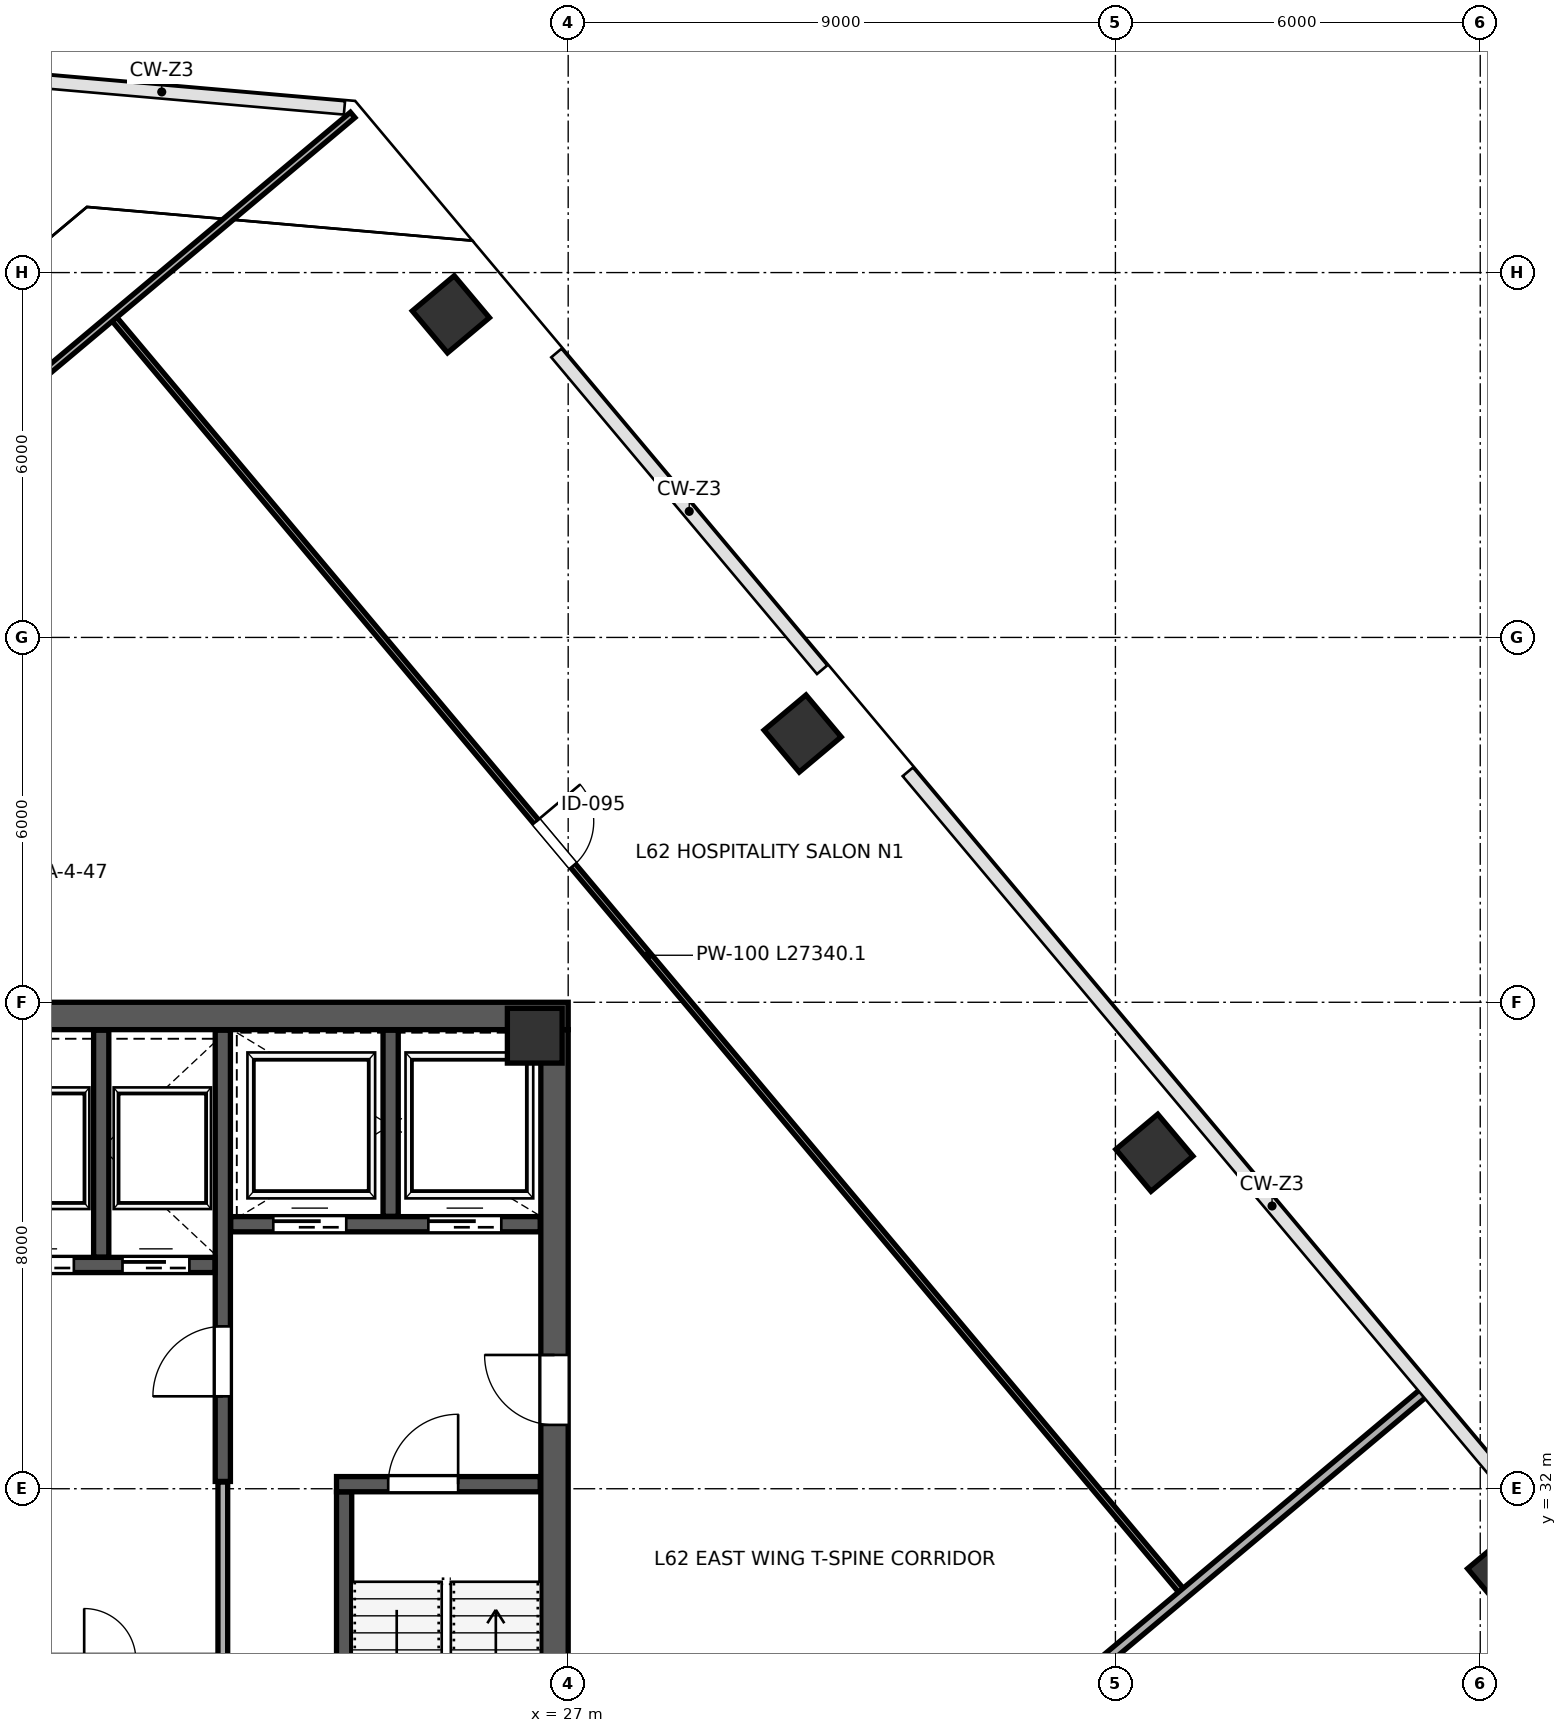
"""IFC4 building model, lengths in metres.
Left out: names, types, materials, properties, quantities, classifications, styles, units other than length and angle.
Written with IfcOpenShell. Run it as: python <this file> out.ifc"""

import sys

from ifc_helpers import new_model, si_unit, direction, frame, frame_2d, origin, origin_2d, place, context, subcontext, project, spatial, rectangle, extrude, clip, halfspace, source, transform, mapped, element, fill, save


model = new_model("IFC4")
c1 = context("Model", 3, precision=1e-05, world=origin(), true_north=direction((0.0, 1.0)))
c2 = subcontext(c1, "Body", "Model", "MODEL_VIEW")
j1 = project(units=[si_unit("LENGTHUNIT", "METRE"), si_unit("PLANEANGLEUNIT", "RADIAN")], contexts=[c1])
p1 = place(None, origin())
s1 = spatial("IfcSite", under=j1, at=p1, CompositionType="ELEMENT")
p2 = place(p1, origin())
s2 = spatial("IfcBuilding", under=s1, at=p2, CompositionType="ELEMENT")
p3 = place(p2, frame((0.0, 0.0, 275.2)))
s3 = spatial("IfcBuildingStorey", under=s2, at=p3, CompositionType="ELEMENT", Elevation=275.2)
m1 = source(origin(), c2, "Body", "SweptSolid", [
    extrude(rectangle(XDim=0.9, YDim=0.9, at=origin_2d()), origin(), (0.0, 0.0, 1.0), 4.198),
])
p4 = place(p3, frame((26.45, 39.45, 0.001), z_axis=(0.0, 0.0, 1.0), x_axis=(1.0, 0.0, 0.0)))
e1 = element("IfcColumn", 1, at=p4, inside=s3, PredefinedType="COLUMN", context=c2, shape_type="MappedRepresentation", body=[
    mapped(m1, transform((0.0, 0.0, 0.0), scale=1.0)),
])
p5 = place(p3, frame((25.071, 51.314, 0.0), z_axis=(0.195757198918, -0.040609509115, 0.97981119959), x_axis=(-0.865497065717, -0.47692710416, 0.153151449724)))
e2 = element("IfcColumn", 2, at=p5, inside=s3, PredefinedType="COLUMN", context=c2, shape_type="Clipping", body=[
    clip(clip(extrude(rectangle(XDim=0.9, YDim=0.9, at=origin_2d()), origin(), (0.0, 0.0, 1.0), 4.286), halfspace(frame((0.0, 0.0, 0.13), z_axis=(0.0, 0.0, -1.0), x_axis=(1.0, 0.0, 0.0)), False)), halfspace(frame((0.0, 0.0, 4.156), z_axis=(0.0, 0.0, 1.0), x_axis=(1.0, 0.0, 0.0)), False)),
])
p6 = place(p3, frame((30.856, 44.419, 0.0), z_axis=(0.125272246636, -0.098702823735, 0.987200393441), x_axis=(-0.991823762749, -0.03687177893, 0.122172400995)))
e3 = element("IfcColumn", 3, at=p6, inside=s3, PredefinedType="COLUMN", context=c2, shape_type="Clipping", body=[
    clip(clip(extrude(rectangle(XDim=0.9, YDim=0.9, at=origin_2d()), origin(), (0.0, 0.0, 1.0), 4.254), halfspace(frame((0.0, 0.0, 0.103), z_axis=(0.0, 0.0, -1.0), x_axis=(1.0, 0.0, 0.0)), False)), halfspace(frame((0.0, 0.0, 4.151), z_axis=(0.0, 0.0, 1.0), x_axis=(1.0, 0.0, 0.0)), False)),
])
p7 = place(p3, frame((36.641, 37.525, 0.0), z_axis=(0.053203849218, -0.156286307078, 0.986277821229), x_axis=(-0.851975649645, 0.508077730488, 0.12646941209)))
e4 = element("IfcColumn", 4, at=p7, inside=s3, PredefinedType="COLUMN", context=c2, shape_type="Clipping", body=[
    clip(clip(extrude(rectangle(XDim=0.9, YDim=0.9, at=origin_2d()), origin(), (0.0, 0.0, 1.0), 4.258), halfspace(frame((0.0, 0.0, 0.107), z_axis=(0.0, 0.0, -1.0), x_axis=(1.0, 0.0, 0.0)), False)), halfspace(frame((0.0, 0.0, 4.151), z_axis=(0.0, 0.0, 1.0), x_axis=(1.0, 0.0, 0.0)), False)),
])
p8 = place(p3, frame((42.426, 30.631, 0.0), z_axis=(-0.018572564847, -0.212079379625, 0.97707594207), x_axis=(-0.57503935286, 0.801706521866, 0.163084013501)))
e5 = element("IfcColumn", 5, at=p8, inside=s3, PredefinedType="COLUMN", context=c2, shape_type="Clipping", body=[
    clip(clip(extrude(rectangle(XDim=0.9, YDim=0.9, at=origin_2d()), origin(), (0.0, 0.0, 1.0), 4.299), halfspace(frame((0.0, 0.0, 0.139), z_axis=(0.0, 0.0, -1.0), x_axis=(1.0, 0.0, 0.0)), False)), halfspace(frame((0.0, 0.0, 4.16), z_axis=(0.0, 0.0, 1.0), x_axis=(1.0, 0.0, 0.0)), False)),
])
p9 = place(p3, frame((26.775, 24.45, 0.0), z_axis=(0.0, 0.0, 1.0), x_axis=(0.0, 1.0, 0.0)))
e6 = element("IfcWall", 6, at=p9, inside=s3, PredefinedType="SHEAR", context=c2, shape_type="SweptSolid", body=[
    extrude(rectangle(XDim=15.1, YDim=0.45, at=frame_2d((7.55, 0.0))), origin(), (0.0, 0.0, 1.0), 3.96),
])
p10 = place(p9, frame((8.6, 0.0, 0.0)))
e7 = element("IfcOpeningElement", 7, at=p10, cuts=e6, PredefinedType="OPENING", context=c2, shape_type="SweptSolid", body=[
    extrude(rectangle(XDim=1.15, YDim=2.2, at=frame_2d((0.575, 1.1))), frame((0.0, 0.235, 0.0), z_axis=(0.0, -1.0, 0.0), x_axis=(1.0, 0.0, 0.0)), (0.0, 0.0, 1.0), 0.47),
])
p11 = place(p3, frame((9.0, 39.775, 0.0), z_axis=(0.0, 0.0, 1.0), x_axis=(1.0, 0.0, 0.0)))
e8 = element("IfcWall", 8, at=p11, inside=s3, PredefinedType="SHEAR", context=c2, shape_type="SweptSolid", body=[
    extrude(rectangle(XDim=18.0, YDim=0.45, at=frame_2d((9.0, 0.0))), origin(), (0.0, 0.0, 1.0), 3.96),
])
p12 = place(p3, frame((23.315, 24.46, 0.0), z_axis=(0.0, 0.0, 1.0), x_axis=(0.0, 1.0, 0.0)))
e9 = element("IfcWall", 9, at=p12, inside=s3, PredefinedType="SHEAR", context=c2, shape_type="SweptSolid", body=[
    extrude(rectangle(XDim=7.49, YDim=0.25, at=frame_2d((3.745, 0.0))), origin(), (0.0, 0.0, 1.0), 3.96),
])
p13 = place(p3, frame((23.19, 32.075, 0.0), z_axis=(0.0, 0.0, 1.0), x_axis=(1.0, 0.0, 0.0)))
e10 = element("IfcWall", 10, at=p13, inside=s3, PredefinedType="SHEAR", context=c2, shape_type="SweptSolid", body=[
    extrude(rectangle(XDim=3.35, YDim=0.25, at=frame_2d((1.675, 0.0))), origin(), (0.0, 0.0, 1.0), 3.96),
])
p14 = place(p13, frame((0.85, 0.0, 0.0)))
e11 = element("IfcOpeningElement", 11, at=p14, cuts=e10, PredefinedType="OPENING", context=c2, shape_type="SweptSolid", body=[
    extrude(rectangle(XDim=1.15, YDim=2.2, at=frame_2d((0.575, 1.1))), frame((0.0, 0.135, 0.0), z_axis=(0.0, -1.0, 0.0), x_axis=(1.0, 0.0, 0.0)), (0.0, 0.0, 1.0), 0.27),
])
p15 = place(p3, frame((21.32, 32.12, 0.0), z_axis=(0.0, 0.0, 1.0), x_axis=(0.0, 1.0, 0.0)))
e12 = element("IfcWall", 12, at=p15, inside=s3, PredefinedType="SHEAR", context=c2, shape_type="SweptSolid", body=[
    extrude(rectangle(XDim=7.42, YDim=0.25, at=frame_2d((3.71, 0.0))), origin(), (0.0, 0.0, 1.0), 3.96),
])
p16 = place(p15, frame((1.4, 0.0, 0.0)))
e13 = element("IfcOpeningElement", 13, at=p16, cuts=e12, PredefinedType="OPENING", context=c2, shape_type="SweptSolid", body=[
    extrude(rectangle(XDim=1.15, YDim=2.2, at=frame_2d((0.575, 1.1))), frame((0.0, 0.135, 0.0), z_axis=(0.0, -1.0, 0.0), x_axis=(1.0, 0.0, 0.0)), (0.0, 0.0, 1.0), 0.27),
])
p17 = place(p3, frame((21.45, 36.35, 0.0), z_axis=(0.0, 0.0, 1.0), x_axis=(1.0, 0.0, 0.0)))
e14 = element("IfcWall", 14, at=p17, inside=s3, PredefinedType="SHEAR", context=c2, shape_type="SweptSolid", body=[
    extrude(rectangle(XDim=5.09, YDim=0.25, at=frame_2d((2.545, 0.0))), origin(), (0.0, 0.0, 1.0), 3.96),
])
p18 = place(p17, frame((0.7, 0.0, 0.0)))
e15 = element("IfcOpeningElement", 15, at=p18, cuts=e14, PredefinedType="OPENING", context=c2, shape_type="SweptSolid", body=[
    extrude(rectangle(XDim=1.2, YDim=2.2, at=frame_2d((0.6, 1.1))), frame((0.0, 0.135, 0.0), z_axis=(0.0, -1.0, 0.0), x_axis=(1.0, 0.0, 0.0)), (0.0, 0.0, 1.0), 0.27),
])
p19 = place(p17, frame((3.25, 0.0, 0.0)))
e16 = element("IfcOpeningElement", 16, at=p19, cuts=e14, PredefinedType="OPENING", context=c2, shape_type="SweptSolid", body=[
    extrude(rectangle(XDim=1.2, YDim=2.2, at=frame_2d((0.6, 1.1))), frame((0.0, 0.135, 0.0), z_axis=(0.0, -1.0, 0.0), x_axis=(1.0, 0.0, 0.0)), (0.0, 0.0, 1.0), 0.27),
])
p20 = place(p3, frame((24.08, 36.48, 0.0), z_axis=(0.0, 0.0, 1.0), x_axis=(0.0, 1.0, 0.0)))
e17 = element("IfcWall", 17, at=p20, inside=s3, PredefinedType="SHEAR", context=c2, shape_type="SweptSolid", body=[
    extrude(rectangle(XDim=3.06, YDim=0.25, at=frame_2d((1.53, 0.0))), origin(), (0.0, 0.0, 1.0), 3.96),
])
p21 = place(p3, frame((17.32, 35.68, 0.0), z_axis=(0.0, 0.0, 1.0), x_axis=(1.0, 0.0, 0.0)))
e18 = element("IfcWall", 18, at=p21, inside=s3, PredefinedType="SHEAR", context=c2, shape_type="SweptSolid", body=[
    extrude(rectangle(XDim=3.87, YDim=0.25, at=frame_2d((1.935, 0.0))), origin(), (0.0, 0.0, 1.0), 3.96),
])
p22 = place(p21, frame((0.45, 0.0, 0.0)))
e19 = element("IfcOpeningElement", 19, at=p22, cuts=e18, PredefinedType="OPENING", context=c2, shape_type="SweptSolid", body=[
    extrude(rectangle(XDim=1.1, YDim=2.2, at=frame_2d((0.55, 1.1))), frame((0.0, 0.135, 0.0), z_axis=(0.0, -1.0, 0.0), x_axis=(1.0, 0.0, 0.0)), (0.0, 0.0, 1.0), 0.27),
])
p23 = place(p21, frame((2.35, 0.0, 0.0)))
e20 = element("IfcOpeningElement", 20, at=p23, cuts=e18, PredefinedType="OPENING", context=c2, shape_type="SweptSolid", body=[
    extrude(rectangle(XDim=1.1, YDim=2.2, at=frame_2d((0.55, 1.1))), frame((0.0, 0.135, 0.0), z_axis=(0.0, -1.0, 0.0), x_axis=(1.0, 0.0, 0.0)), (0.0, 0.0, 1.0), 0.27),
])
p24 = place(p3, frame((19.32, 35.81, 0.0), z_axis=(0.0, 0.0, 1.0), x_axis=(0.0, 1.0, 0.0)))
e21 = element("IfcWall", 21, at=p24, inside=s3, PredefinedType="SHEAR", context=c2, shape_type="SweptSolid", body=[
    extrude(rectangle(XDim=3.73, YDim=0.25, at=frame_2d((1.865, 0.0))), origin(), (0.0, 0.0, 1.0), 3.96),
])
p25 = place(p3, frame((21.32, 29.19, 0.0), z_axis=(0.0, 0.0, 1.0), x_axis=(0.0, 1.0, 0.0)))
e22 = element("IfcWall", 22, at=p25, inside=s3, PredefinedType="PARTITIONING", context=c2, shape_type="SweptSolid", body=[
    extrude(rectangle(XDim=2.92, YDim=0.16, at=frame_2d((1.46, 0.0))), origin(), (0.0, 0.0, 1.0), 3.96),
])
p26 = place(p3, frame((19.528, 51.245, 0.0), z_axis=(0.0, 0.0, 1.0), x_axis=(0.642782364439, -0.766048844374, 0.0)))
e23 = element("IfcWall", 23, at=p26, inside=s3, PredefinedType="PARTITIONING", context=c2, shape_type="SweptSolid", body=[
    extrude(rectangle(XDim=27.34, YDim=0.1, at=frame_2d((13.67, 0.0))), origin(), (0.0, 0.0, 1.0), 3.96),
])
p27 = place(p26, frame((10.8, 0.0, 0.0)))
e24 = element("IfcOpeningElement", 24, at=p27, cuts=e23, PredefinedType="OPENING", context=c2, shape_type="SweptSolid", body=[
    extrude(rectangle(XDim=0.95, YDim=2.15, at=frame_2d((0.475, 1.075))), frame((0.0, 0.06, 0.0), z_axis=(0.0, -1.0, 0.0), x_axis=(1.0, 0.0, 0.0)), (0.0, 0.0, 1.0), 0.12),
])
p28 = place(p3, frame((0.849, 35.624, 0.0), z_axis=(0.0, 0.0, 1.0), x_axis=(0.766042777978, 0.642789594119, 0.0)))
e25 = element("IfcWall", 25, at=p28, inside=s3, PredefinedType="PARTITIONING", context=c2, shape_type="SweptSolid", body=[
    extrude(rectangle(XDim=29.51, YDim=0.115, at=frame_2d((14.755, 0.0))), origin(), (0.0, 0.0, 1.0), 3.96),
])
p29 = place(p28, frame((2.6, 0.0, 0.0)))
e26 = element("IfcOpeningElement", 26, at=p29, cuts=e25, PredefinedType="OPENING", context=c2, shape_type="SweptSolid", body=[
    extrude(rectangle(XDim=0.95, YDim=2.15, at=frame_2d((0.475, 1.075))), frame((0.0, 0.067, 0.0), z_axis=(0.0, -1.0, 0.0), x_axis=(1.0, 0.0, 0.0)), (0.0, 0.0, 1.0), 0.135),
])
p30 = place(p3, frame((25.576, 20.577, 0.0), z_axis=(0.0, 0.0, 1.0), x_axis=(0.76604764673, 0.642783791752, 0.0)))
e27 = element("IfcWall", 27, at=p30, inside=s3, PredefinedType="PARTITIONING", context=c2, shape_type="SweptSolid", body=[
    extrude(rectangle(XDim=20.24, YDim=0.16, at=frame_2d((10.12, 0.0))), origin(), (0.0, 0.0, 1.0), 3.195),
])
p31 = place(p3, frame((28.796, 16.74, 0.0), z_axis=(0.0, 0.0, 1.0), x_axis=(0.766036723368, 0.642796809616, 0.0)))
e28 = element("IfcWall", 28, at=p31, inside=s3, PredefinedType="PARTITIONING", context=c2, shape_type="SweptSolid", body=[
    extrude(rectangle(XDim=20.24, YDim=0.135, at=frame_2d((10.12, 0.0))), origin(), (0.0, 0.0, 1.0), 3.96),
])
m2 = source(origin(), c2, "Body", "SweptSolid", [
    extrude(rectangle(XDim=1.15, YDim=2.2, at=frame_2d((0.575, 1.1))), frame((0.0, 0.025, 0.0), z_axis=(0.0, -1.0, 0.0), x_axis=(1.0, 0.0, 0.0)), (0.0, 0.0, 1.0), 0.05),
])
p32 = place(p16, origin())
e29 = element("IfcDoor", 29, at=p32, inside=s3, OperationType="SINGLE_SWING_LEFT", PredefinedType="DOOR", context=c2, shape_type="MappedRepresentation", body=[
    mapped(m2, transform((0.0, 0.0, 0.0), scale=1.0)),
])
fill(e13, e29)
m3 = source(origin(), c2, "Body", "SweptSolid", [
    extrude(rectangle(XDim=1.15, YDim=2.2, at=frame_2d((0.575, 1.1))), frame((0.0, 0.025, 0.0), z_axis=(0.0, -1.0, 0.0), x_axis=(1.0, 0.0, 0.0)), (0.0, 0.0, 1.0), 0.05),
])
p33 = place(p14, origin())
e30 = element("IfcDoor", 30, at=p33, inside=s3, OperationType="SINGLE_SWING_RIGHT", PredefinedType="DOOR", context=c2, shape_type="MappedRepresentation", body=[
    mapped(m3, transform((0.0, 0.0, 0.0), scale=1.0)),
])
fill(e11, e30)
p34 = place(p10, origin())
e31 = element("IfcDoor", 31, at=p34, inside=s3, OperationType="SINGLE_SWING_RIGHT", PredefinedType="DOOR", context=c2, shape_type="MappedRepresentation", body=[
    mapped(m2, transform((0.0, 0.0, 0.0), scale=1.0)),
])
fill(e7, e31)
m4 = source(origin(), c2, "Body", "SweptSolid", [
    extrude(rectangle(XDim=1.1, YDim=2.2, at=frame_2d((0.55, 1.1))), frame((0.0, 0.025, 0.0), z_axis=(0.0, -1.0, 0.0), x_axis=(1.0, 0.0, 0.0)), (0.0, 0.0, 1.0), 0.05),
])
p35 = place(p22, origin())
e32 = element("IfcDoor", 32, at=p35, inside=s3, OperationType="SLIDING_TO_LEFT", PredefinedType="DOOR", context=c2, shape_type="MappedRepresentation", body=[
    mapped(m4, transform((0.0, 0.0, 0.0), scale=1.0)),
])
fill(e19, e32)
p36 = place(p23, origin())
e33 = element("IfcDoor", 33, at=p36, inside=s3, OperationType="SLIDING_TO_RIGHT", PredefinedType="DOOR", context=c2, shape_type="MappedRepresentation", body=[
    mapped(m4, transform((0.0, 0.0, 0.0), scale=1.0)),
])
fill(e20, e33)
m5 = source(origin(), c2, "Body", "SweptSolid", [
    extrude(rectangle(XDim=1.2, YDim=2.2, at=frame_2d((0.6, 1.1))), frame((0.0, 0.025, 0.0), z_axis=(0.0, -1.0, 0.0), x_axis=(1.0, 0.0, 0.0)), (0.0, 0.0, 1.0), 0.05),
])
p37 = place(p18, origin())
e34 = element("IfcDoor", 34, at=p37, inside=s3, OperationType="SLIDING_TO_LEFT", PredefinedType="DOOR", context=c2, shape_type="MappedRepresentation", body=[
    mapped(m5, transform((0.0, 0.0, 0.0), scale=1.0)),
])
fill(e15, e34)
p38 = place(p19, origin())
e35 = element("IfcDoor", 35, at=p38, inside=s3, OperationType="SLIDING_TO_RIGHT", PredefinedType="DOOR", context=c2, shape_type="MappedRepresentation", body=[
    mapped(m5, transform((0.0, 0.0, 0.0), scale=1.0)),
])
fill(e16, e35)
m6 = source(origin(), c2, "Body", "SweptSolid", [
    extrude(rectangle(XDim=0.95, YDim=2.15, at=frame_2d((0.475, 1.075))), frame((0.0, 0.025, 0.0), z_axis=(0.0, -1.0, 0.0), x_axis=(1.0, 0.0, 0.0)), (0.0, 0.0, 1.0), 0.05),
])
p39 = place(p27, origin())
e36 = element("IfcDoor", 36, at=p39, inside=s3, OperationType="SINGLE_SWING_LEFT", PredefinedType="DOOR", context=c2, shape_type="MappedRepresentation", body=[
    mapped(m6, transform((0.0, 0.0, 0.0), scale=1.0)),
])
fill(e24, e36)
save(model, sys.argv[1])
